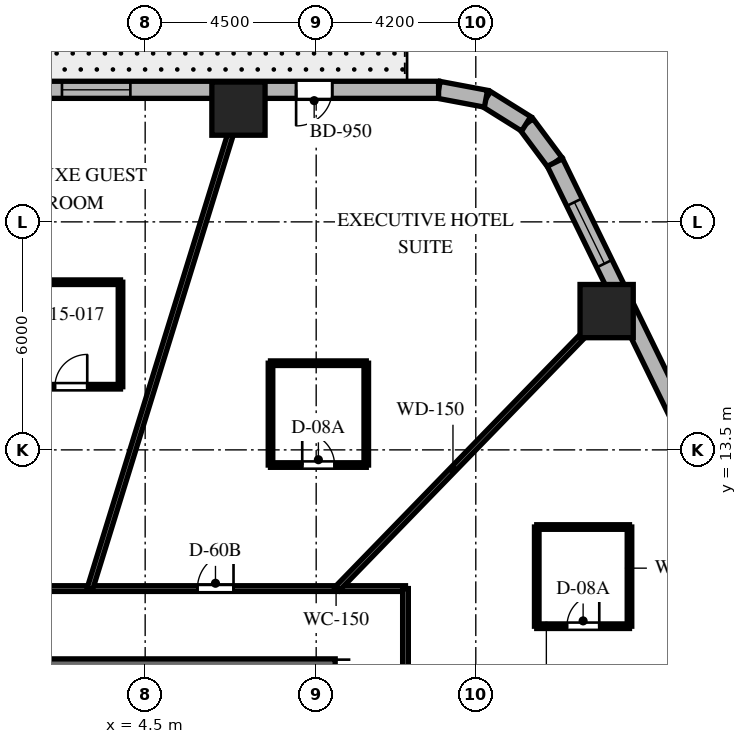
"""IFC4 building model, lengths in metres.
Left out: names, types, materials, properties, quantities, classifications, styles, units other than length and angle.
Written with IfcOpenShell. Run it as: python <this file> out.ifc"""

import sys

from ifc_helpers import new_model, si_unit, direction, frame, frame_2d, origin, origin_2d, place, context, subcontext, project, spatial, rectangle, extrude, element, fill, save


model = new_model("IFC4")
c1 = context("Model", 3, precision=1e-05, world=origin(), true_north=direction((0.0, 1.0)))
c2 = subcontext(c1, "Body", "Model", "MODEL_VIEW")
j1 = project(units=[si_unit("LENGTHUNIT", "METRE"), si_unit("PLANEANGLEUNIT", "RADIAN")], contexts=[c1])
p1 = place(None, origin())
s1 = spatial("IfcSite", under=j1, at=p1, CompositionType="ELEMENT")
p2 = place(p1, origin())
s2 = spatial("IfcBuilding", under=s1, at=p2, CompositionType="ELEMENT")
p3 = place(p2, frame((0.0, 0.0, 67.5)))
s3 = spatial("IfcBuildingStorey", under=s2, at=p3, CompositionType="ELEMENT", Elevation=67.5)
p4 = place(p3, frame((1.85, 7.5, 0.0), z_axis=(0.0, 0.0, 1.0), x_axis=(1.0, 0.0, 0.0)))
e1 = element("IfcWall", 1, at=p4, inside=s3, PredefinedType="SHEAR", context=c2, shape_type="SweptSolid", body=[
    extrude(rectangle(XDim=7.65, YDim=1.0, at=frame_2d((3.825, 0.0))), origin(), (0.0, 0.0, 1.0), 3.7),
])
for number, where, z_axis, x_axis in (
    (2, (16.643, 17.152, 0.0), (0.0, 0.0, 1.0), (1.0, 0.0, 0.0)),
    (3, (6.955, 22.48, 0.0), (0.0, 0.0, 1.0), (1.0, 0.0, 0.0)),
):
    element("IfcColumn", number, at=place(p3, frame(where, z_axis=z_axis, x_axis=x_axis)), inside=s3, PredefinedType="COLUMN", context=c2, shape_type="SweptSolid", body=[
        extrude(rectangle(XDim=1.4, YDim=1.4, at=origin_2d()), origin(), (0.0, 0.0, 1.0), 3.7),
    ])
p5 = place(p3, frame((15.284, 21.062, 0.0), z_axis=(0.0, 0.0, 1.0), x_axis=(-0.597595366449, 0.801797841104, 0.0)))
e4 = element("IfcWall", 4, at=p5, inside=s3, PredefinedType="SOLIDWALL", context=c2, shape_type="SweptSolid", body=[
    extrude(rectangle(XDim=1.269, YDim=0.45, at=frame_2d((0.634, 0.0))), origin(), (0.0, 0.0, 1.0), 3.4),
])
p6 = place(p3, frame((14.526, 22.08, 0.0), z_axis=(0.0, 0.0, 1.0), x_axis=(-0.848185203596, 0.529699783275, 0.0)))
e5 = element("IfcWall", 5, at=p6, inside=s3, PredefinedType="SOLIDWALL", context=c2, shape_type="SweptSolid", body=[
    extrude(rectangle(XDim=1.247, YDim=0.45, at=frame_2d((0.624, 0.0))), origin(), (0.0, 0.0, 1.0), 3.4),
])
p7 = place(p3, frame((13.468, 22.74, 0.0), z_axis=(0.0, 0.0, 1.0), x_axis=(-0.982717174228, 0.185113358451, 0.0)))
e6 = element("IfcWall", 6, at=p7, inside=s3, PredefinedType="SOLIDWALL", context=c2, shape_type="SweptSolid", body=[
    extrude(rectangle(XDim=1.269, YDim=0.45, at=frame_2d((0.634, 0.0))), origin(), (0.0, 0.0, 1.0), 3.4),
])
p8 = place(p3, frame((24.336, 2.532, 0.0), z_axis=(0.0, 0.0, 1.0), x_axis=(-0.438931326393, 0.898520612291, 0.0)))
e7 = element("IfcWall", 7, at=p8, inside=s3, PredefinedType="SOLIDWALL", context=c2, shape_type="SweptSolid", body=[
    extrude(rectangle(XDim=20.623, YDim=0.45, at=frame_2d((10.312, 0.0))), origin(), (0.0, 0.0, 1.0), 3.4),
])
p9 = place(p8, frame((9.462, 0.0, 0.8)))
e8 = element("IfcOpeningElement", 8, at=p9, cuts=e7, PredefinedType="OPENING", context=c2, shape_type="SweptSolid", body=[
    extrude(rectangle(XDim=1.8, YDim=1.8, at=frame_2d((0.9, 0.9))), frame((0.0, 0.235, 0.0), z_axis=(0.0, -1.0, 0.0), x_axis=(1.0, 0.0, 0.0)), (0.0, 0.0, 1.0), 0.47),
])
p10 = place(p8, frame((17.66, 0.0, 0.8)))
e9 = element("IfcOpeningElement", 9, at=p10, cuts=e7, PredefinedType="OPENING", context=c2, shape_type="SweptSolid", body=[
    extrude(rectangle(XDim=1.8, YDim=1.8, at=frame_2d((0.9, 0.9))), frame((0.0, 0.235, 0.0), z_axis=(0.0, -1.0, 0.0), x_axis=(1.0, 0.0, 0.0)), (0.0, 0.0, 1.0), 0.47),
])
p11 = place(p8, frame((1.214, 0.0, 0.8)))
e10 = element("IfcOpeningElement", 10, at=p11, cuts=e7, PredefinedType="OPENING", context=c2, shape_type="SweptSolid", body=[
    extrude(rectangle(XDim=1.8, YDim=1.8, at=frame_2d((0.9, 0.9))), frame((0.0, 0.235, 0.0), z_axis=(0.0, -1.0, 0.0), x_axis=(1.0, 0.0, 0.0)), (0.0, 0.0, 1.0), 0.47),
])
p12 = place(p3, frame((12.221, 22.975, 0.0), z_axis=(0.0, 0.0, 1.0), x_axis=(-1.0, 0.0, 0.0)))
e11 = element("IfcWall", 11, at=p12, inside=s3, PredefinedType="SOLIDWALL", context=c2, shape_type="SweptSolid", body=[
    extrude(rectangle(XDim=26.389, YDim=0.45, at=frame_2d((13.195, 0.0))), origin(), (0.0, 0.0, 1.0), 3.4),
])
p13 = place(p12, frame((2.799, 0.0, 0.0)))
e12 = element("IfcOpeningElement", 12, at=p13, cuts=e11, PredefinedType="OPENING", context=c2, shape_type="SweptSolid", body=[
    extrude(rectangle(XDim=0.95, YDim=2.15, at=frame_2d((0.475, 1.075))), frame((0.0, 0.235, 0.0), z_axis=(0.0, -1.0, 0.0), x_axis=(1.0, 0.0, 0.0)), (0.0, 0.0, 1.0), 0.47),
])
p14 = place(p12, frame((8.11, 0.0, 0.8)))
e13 = element("IfcOpeningElement", 13, at=p14, cuts=e11, PredefinedType="OPENING", context=c2, shape_type="SweptSolid", body=[
    extrude(rectangle(XDim=1.8, YDim=1.8, at=frame_2d((0.9, 0.9))), frame((0.0, 0.235, 0.0), z_axis=(0.0, -1.0, 0.0), x_axis=(1.0, 0.0, 0.0)), (0.0, 0.0, 1.0), 0.47),
])
p15 = place(p12, frame((15.46, 0.0, 0.8)))
e14 = element("IfcOpeningElement", 14, at=p15, cuts=e11, PredefinedType="OPENING", context=c2, shape_type="SweptSolid", body=[
    extrude(rectangle(XDim=1.8, YDim=1.8, at=frame_2d((0.9, 0.9))), frame((0.0, 0.235, 0.0), z_axis=(0.0, -1.0, 0.0), x_axis=(1.0, 0.0, 0.0)), (0.0, 0.0, 1.0), 0.47),
])
p16 = place(p12, frame((22.938, 0.0, 0.8)))
e15 = element("IfcOpeningElement", 15, at=p16, cuts=e11, PredefinedType="OPENING", context=c2, shape_type="SweptSolid", body=[
    extrude(rectangle(XDim=1.8, YDim=1.8, at=frame_2d((0.9, 0.9))), frame((0.0, 0.235, 0.0), z_axis=(0.0, -1.0, 0.0), x_axis=(1.0, 0.0, 0.0)), (0.0, 0.0, 1.0), 0.47),
])
p17 = place(p3, frame((-11.35, 9.85, 0.0), z_axis=(0.0, 0.0, 1.0), x_axis=(1.0, 0.0, 0.0)))
e16 = element("IfcWall", 16, at=p17, inside=s3, PredefinedType="PARTITIONING", context=c2, shape_type="SweptSolid", body=[
    extrude(rectangle(XDim=22.7, YDim=0.15, at=frame_2d((11.35, 0.0))), origin(), (0.0, 0.0, 1.0), 2.84),
])
p18 = place(p17, frame((17.225, 0.0, 0.0)))
e17 = element("IfcOpeningElement", 17, at=p18, cuts=e16, PredefinedType="OPENING", context=c2, shape_type="SweptSolid", body=[
    extrude(rectangle(XDim=0.95, YDim=2.03, at=frame_2d((0.475, 1.015))), frame((0.0, 0.085, 0.0), z_axis=(0.0, -1.0, 0.0), x_axis=(1.0, 0.0, 0.0)), (0.0, 0.0, 1.0), 0.17),
])
p19 = place(p17, frame((12.415, 0.0, 0.0)))
e18 = element("IfcOpeningElement", 18, at=p19, cuts=e16, PredefinedType="OPENING", context=c2, shape_type="SweptSolid", body=[
    extrude(rectangle(XDim=0.95, YDim=2.03, at=frame_2d((0.475, 1.015))), frame((0.0, 0.085, 0.0), z_axis=(0.0, -1.0, 0.0), x_axis=(1.0, 0.0, 0.0)), (0.0, 0.0, 1.0), 0.17),
])
p20 = place(p17, frame((8.925, 0.0, 0.0)))
e19 = element("IfcOpeningElement", 19, at=p20, cuts=e16, PredefinedType="OPENING", context=c2, shape_type="SweptSolid", body=[
    extrude(rectangle(XDim=0.95, YDim=2.03, at=frame_2d((0.475, 1.015))), frame((0.0, 0.085, 0.0), z_axis=(0.0, -1.0, 0.0), x_axis=(1.0, 0.0, 0.0)), (0.0, 0.0, 1.0), 0.17),
])
p21 = place(p17, frame((3.369, 0.0, 0.0)))
e20 = element("IfcOpeningElement", 20, at=p21, cuts=e16, PredefinedType="OPENING", context=c2, shape_type="SweptSolid", body=[
    extrude(rectangle(XDim=0.95, YDim=2.03, at=frame_2d((0.475, 1.015))), frame((0.0, 0.085, 0.0), z_axis=(0.0, -1.0, 0.0), x_axis=(1.0, 0.0, 0.0)), (0.0, 0.0, 1.0), 0.17),
])
p22 = place(p3, frame((11.35, 9.85, 0.0), z_axis=(0.0, 0.0, 1.0), x_axis=(0.0, -1.0, 0.0)))
e21 = element("IfcWall", 21, at=p22, inside=s3, PredefinedType="PARTITIONING", context=c2, shape_type="SweptSolid", body=[
    extrude(rectangle(XDim=19.7, YDim=0.15, at=frame_2d((9.85, 0.0))), origin(), (0.0, 0.0, 1.0), 2.84),
])
p23 = place(p22, frame((3.024, 0.0, 0.0)))
e22 = element("IfcOpeningElement", 22, at=p23, cuts=e21, PredefinedType="OPENING", context=c2, shape_type="SweptSolid", body=[
    extrude(rectangle(XDim=0.95, YDim=2.03, at=frame_2d((0.475, 1.015))), frame((0.0, 0.085, 0.0), z_axis=(0.0, -1.0, 0.0), x_axis=(1.0, 0.0, 0.0)), (0.0, 0.0, 1.0), 0.17),
])
p24 = place(p22, frame((15.191, 0.0, 0.0)))
e23 = element("IfcOpeningElement", 23, at=p24, cuts=e21, PredefinedType="OPENING", context=c2, shape_type="SweptSolid", body=[
    extrude(rectangle(XDim=0.95, YDim=2.03, at=frame_2d((0.475, 1.015))), frame((0.0, 0.085, 0.0), z_axis=(0.0, -1.0, 0.0), x_axis=(1.0, 0.0, 0.0)), (0.0, 0.0, 1.0), 0.17),
])
p25 = place(p22, frame((8.838, 0.0, 0.0)))
e24 = element("IfcOpeningElement", 24, at=p25, cuts=e21, PredefinedType="OPENING", context=c2, shape_type="SweptSolid", body=[
    extrude(rectangle(XDim=0.95, YDim=2.03, at=frame_2d((0.475, 1.015))), frame((0.0, 0.085, 0.0), z_axis=(0.0, -1.0, 0.0), x_axis=(1.0, 0.0, 0.0)), (0.0, 0.0, 1.0), 0.17),
])
p26 = place(p3, frame((9.558, 9.85, 0.0), z_axis=(0.0, 0.0, 1.0), x_axis=(0.69638346089, 0.717669893056, 0.0)))
e25 = element("IfcWall", 25, at=p26, inside=s3, PredefinedType="PARTITIONING", context=c2, shape_type="SweptSolid", body=[
    extrude(rectangle(XDim=10.701, YDim=0.15, at=frame_2d((5.351, 0.0))), origin(), (0.0, 0.0, 1.0), 2.54),
])
p27 = place(p3, frame((3.048, 9.85, 0.0), z_axis=(0.0, 0.0, 1.0), x_axis=(0.295553992761, 0.955326037206, 0.0)))
e26 = element("IfcWall", 26, at=p27, inside=s3, PredefinedType="PARTITIONING", context=c2, shape_type="SweptSolid", body=[
    extrude(rectangle(XDim=13.739, YDim=0.15, at=frame_2d((6.869, 0.0))), origin(), (0.0, 0.0, 1.0), 2.54),
])
p28 = place(p3, frame((14.804, 8.86, 0.0), z_axis=(0.0, 0.0, 1.0), x_axis=(1.0, 0.0, 0.0)))
e27 = element("IfcWall", 27, at=p28, inside=s3, PredefinedType="PARTITIONING", context=c2, shape_type="SweptSolid", body=[
    extrude(rectangle(XDim=2.44, YDim=0.12, at=frame_2d((1.22, 0.0))), origin(), (0.0, 0.0, 1.0), 2.927),
])
p29 = place(p28, frame((0.795, 0.0, 0.0)))
e28 = element("IfcOpeningElement", 28, at=p29, cuts=e27, PredefinedType="OPENING", context=c2, shape_type="SweptSolid", body=[
    extrude(rectangle(XDim=0.85, YDim=2.03, at=frame_2d((0.425, 1.015))), frame((0.0, 0.07, 0.0), z_axis=(0.0, -1.0, 0.0), x_axis=(1.0, 0.0, 0.0)), (0.0, 0.0, 1.0), 0.14),
])
p30 = place(p3, frame((17.244, 8.86, 0.0), z_axis=(0.0, 0.0, 1.0), x_axis=(0.0, 1.0, 0.0)))
e29 = element("IfcWall", 29, at=p30, inside=s3, PredefinedType="PARTITIONING", context=c2, shape_type="SweptSolid", body=[
    extrude(rectangle(XDim=2.61, YDim=0.12, at=frame_2d((1.305, 0.0))), origin(), (0.0, 0.0, 1.0), 3.4),
])
p31 = place(p3, frame((17.244, 11.47, 0.0), z_axis=(0.0, 0.0, 1.0), x_axis=(-1.0, 0.0, 0.0)))
e30 = element("IfcWall", 30, at=p31, inside=s3, PredefinedType="PARTITIONING", context=c2, shape_type="SweptSolid", body=[
    extrude(rectangle(XDim=2.44, YDim=0.12, at=frame_2d((1.22, 0.0))), origin(), (0.0, 0.0, 1.0), 2.927),
])
p32 = place(p3, frame((14.804, 11.47, 0.0), z_axis=(0.0, 0.0, 1.0), x_axis=(0.0, -1.0, 0.0)))
e31 = element("IfcWall", 31, at=p32, inside=s3, PredefinedType="PARTITIONING", context=c2, shape_type="SweptSolid", body=[
    extrude(rectangle(XDim=2.61, YDim=0.12, at=frame_2d((1.305, 0.0))), origin(), (0.0, 0.0, 1.0), 3.4),
])
p33 = place(p3, frame((7.798, 13.101, 0.0), z_axis=(0.0, 0.0, 1.0), x_axis=(1.0, 0.0, 0.0)))
e32 = element("IfcWall", 32, at=p33, inside=s3, PredefinedType="PARTITIONING", context=c2, shape_type="SweptSolid", body=[
    extrude(rectangle(XDim=2.52, YDim=0.12, at=frame_2d((1.26, 0.0))), origin(), (0.0, 0.0, 1.0), 2.84),
])
p34 = place(p33, frame((0.835, 0.0, 0.0)))
e33 = element("IfcOpeningElement", 33, at=p34, cuts=e32, PredefinedType="OPENING", context=c2, shape_type="SweptSolid", body=[
    extrude(rectangle(XDim=0.85, YDim=2.03, at=frame_2d((0.425, 1.015))), frame((0.0, 0.07, 0.0), z_axis=(0.0, -1.0, 0.0), x_axis=(1.0, 0.0, 0.0)), (0.0, 0.0, 1.0), 0.14),
])
p35 = place(p3, frame((10.318, 13.101, 0.0), z_axis=(0.0, 0.0, 1.0), x_axis=(0.0, 1.0, 0.0)))
e34 = element("IfcWall", 34, at=p35, inside=s3, PredefinedType="PARTITIONING", context=c2, shape_type="SweptSolid", body=[
    extrude(rectangle(XDim=2.68, YDim=0.12, at=frame_2d((1.34, 0.0))), origin(), (0.0, 0.0, 1.0), 3.4),
])
p36 = place(p3, frame((10.318, 15.781, 0.0), z_axis=(0.0, 0.0, 1.0), x_axis=(-1.0, 0.0, 0.0)))
e35 = element("IfcWall", 35, at=p36, inside=s3, PredefinedType="PARTITIONING", context=c2, shape_type="SweptSolid", body=[
    extrude(rectangle(XDim=2.52, YDim=0.12, at=frame_2d((1.26, 0.0))), origin(), (0.0, 0.0, 1.0), 2.84),
])
p37 = place(p3, frame((7.798, 15.781, 0.0), z_axis=(0.0, 0.0, 1.0), x_axis=(0.0, -1.0, 0.0)))
e36 = element("IfcWall", 36, at=p37, inside=s3, PredefinedType="PARTITIONING", context=c2, shape_type="SweptSolid", body=[
    extrude(rectangle(XDim=2.68, YDim=0.12, at=frame_2d((1.34, 0.0))), origin(), (0.0, 0.0, 1.0), 2.84),
])
p38 = place(p3, frame((1.251, 15.162, 0.0), z_axis=(0.0, 0.0, 1.0), x_axis=(1.0, 0.0, 0.0)))
e37 = element("IfcWall", 37, at=p38, inside=s3, PredefinedType="PARTITIONING", context=c2, shape_type="SweptSolid", body=[
    extrude(rectangle(XDim=2.6, YDim=0.12, at=frame_2d((1.3, 0.0))), origin(), (0.0, 0.0, 1.0), 3.4),
])
p39 = place(p38, frame((0.875, 0.0, 0.0)))
e38 = element("IfcOpeningElement", 38, at=p39, cuts=e37, PredefinedType="OPENING", context=c2, shape_type="SweptSolid", body=[
    extrude(rectangle(XDim=0.85, YDim=2.03, at=frame_2d((0.425, 1.015))), frame((0.0, 0.07, 0.0), z_axis=(0.0, -1.0, 0.0), x_axis=(1.0, 0.0, 0.0)), (0.0, 0.0, 1.0), 0.14),
])
p40 = place(p3, frame((3.851, 15.162, 0.0), z_axis=(0.0, 0.0, 1.0), x_axis=(0.0, 1.0, 0.0)))
e39 = element("IfcWall", 39, at=p40, inside=s3, PredefinedType="PARTITIONING", context=c2, shape_type="SweptSolid", body=[
    extrude(rectangle(XDim=2.75, YDim=0.12, at=frame_2d((1.375, 0.0))), origin(), (0.0, 0.0, 1.0), 2.84),
])
p41 = place(p3, frame((3.851, 17.912, 0.0), z_axis=(0.0, 0.0, 1.0), x_axis=(-1.0, 0.0, 0.0)))
e40 = element("IfcWall", 40, at=p41, inside=s3, PredefinedType="PARTITIONING", context=c2, shape_type="SweptSolid", body=[
    extrude(rectangle(XDim=2.6, YDim=0.12, at=frame_2d((1.3, 0.0))), origin(), (0.0, 0.0, 1.0), 3.4),
])
p42 = place(p10, origin())
e41 = element("IfcWindow", 41, at=p42, inside=s3, PartitioningType="SINGLE_PANEL", PredefinedType="WINDOW", context=c2, shape_type="SweptSolid", body=[
    extrude(rectangle(XDim=1.8, YDim=1.8, at=frame_2d((0.9, 0.9))), frame((0.0, 0.03, 0.0), z_axis=(0.0, -1.0, 0.0), x_axis=(1.0, 0.0, 0.0)), (0.0, 0.0, 1.0), 0.06),
])
fill(e9, e41)
p43 = place(p13, origin())
e42 = element("IfcDoor", 42, at=p43, inside=s3, OperationType="SINGLE_SWING_RIGHT", PredefinedType="DOOR", context=c2, shape_type="SweptSolid", body=[
    extrude(rectangle(XDim=0.95, YDim=2.15, at=frame_2d((0.475, 1.075))), frame((0.0, 0.025, 0.0), z_axis=(0.0, -1.0, 0.0), x_axis=(1.0, 0.0, 0.0)), (0.0, 0.0, 1.0), 0.05),
])
fill(e12, e42)
p44 = place(p14, origin())
e43 = element("IfcWindow", 43, at=p44, inside=s3, PartitioningType="SINGLE_PANEL", PredefinedType="WINDOW", context=c2, shape_type="SweptSolid", body=[
    extrude(rectangle(XDim=1.8, YDim=1.8, at=frame_2d((0.9, 0.9))), frame((0.0, 0.03, 0.0), z_axis=(0.0, -1.0, 0.0), x_axis=(1.0, 0.0, 0.0)), (0.0, 0.0, 1.0), 0.06),
])
fill(e13, e43)
p45 = place(p29, origin())
e44 = element("IfcDoor", 44, at=p45, inside=s3, OperationType="SINGLE_SWING_RIGHT", PredefinedType="DOOR", context=c2, shape_type="SweptSolid", body=[
    extrude(rectangle(XDim=0.85, YDim=2.03, at=frame_2d((0.425, 1.015))), frame((0.0, 0.025, 0.0), z_axis=(0.0, -1.0, 0.0), x_axis=(1.0, 0.0, 0.0)), (0.0, 0.0, 1.0), 0.05),
])
fill(e28, e44)
p46 = place(p18, origin())
e45 = element("IfcDoor", 45, at=p46, inside=s3, OperationType="SINGLE_SWING_RIGHT", PredefinedType="DOOR", context=c2, shape_type="SweptSolid", body=[
    extrude(rectangle(XDim=0.95, YDim=2.03, at=frame_2d((0.475, 1.015))), frame((0.0, 0.025, 0.0), z_axis=(0.0, -1.0, 0.0), x_axis=(1.0, 0.0, 0.0)), (0.0, 0.0, 1.0), 0.05),
])
fill(e17, e45)
p47 = place(p34, origin())
e46 = element("IfcDoor", 46, at=p47, inside=s3, OperationType="SINGLE_SWING_LEFT", PredefinedType="DOOR", context=c2, shape_type="SweptSolid", body=[
    extrude(rectangle(XDim=0.85, YDim=2.03, at=frame_2d((0.425, 1.015))), frame((0.0, 0.025, 0.0), z_axis=(0.0, -1.0, 0.0), x_axis=(1.0, 0.0, 0.0)), (0.0, 0.0, 1.0), 0.05),
])
fill(e33, e46)
p48 = place(p39, origin())
e47 = element("IfcDoor", 47, at=p48, inside=s3, OperationType="SINGLE_SWING_RIGHT", PredefinedType="DOOR", context=c2, shape_type="SweptSolid", body=[
    extrude(rectangle(XDim=0.85, YDim=2.03, at=frame_2d((0.425, 1.015))), frame((0.0, 0.025, 0.0), z_axis=(0.0, -1.0, 0.0), x_axis=(1.0, 0.0, 0.0)), (0.0, 0.0, 1.0), 0.05),
])
fill(e38, e47)
save(model, sys.argv[1])
